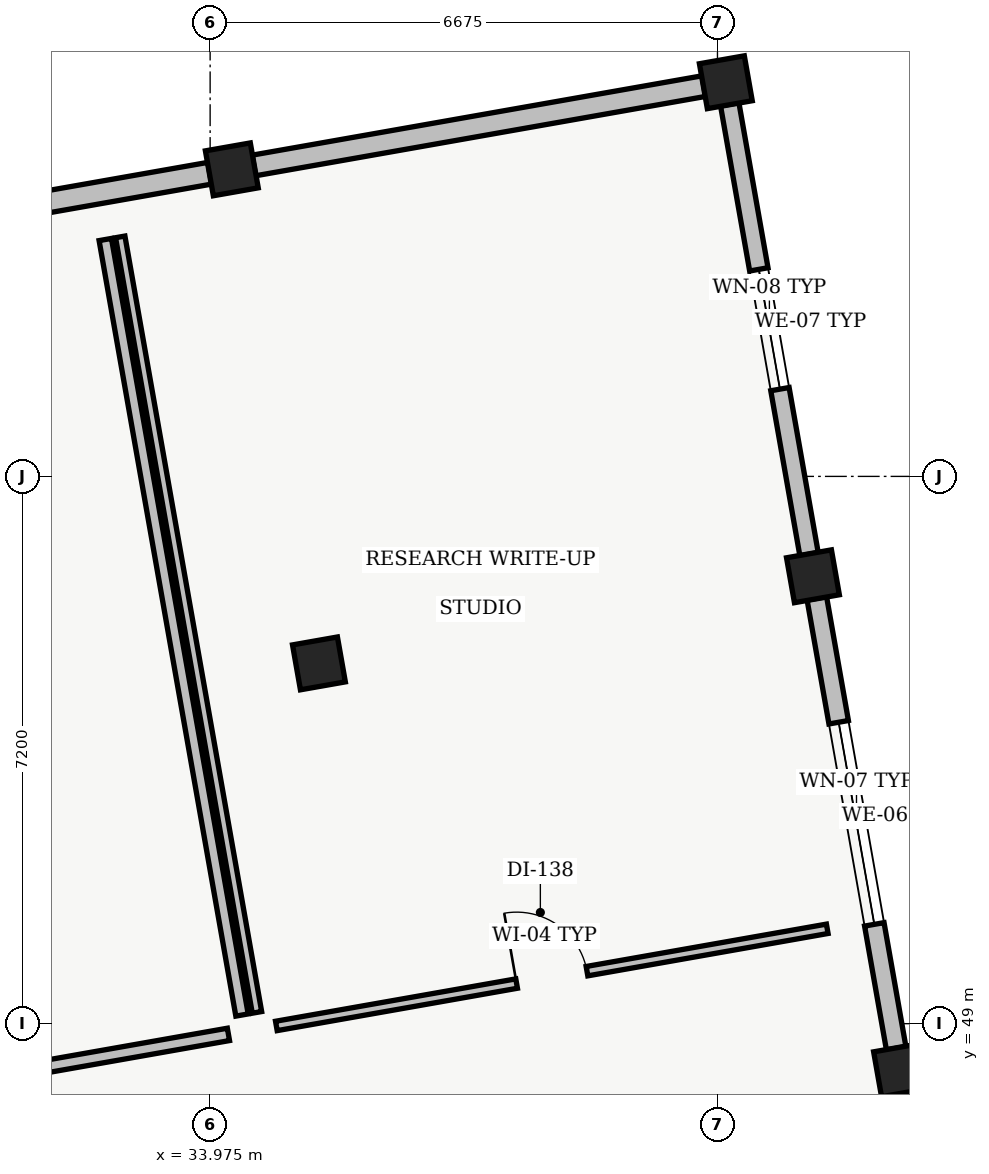
"""IFC4 building model, lengths in metres.
Left out: names, types, materials, properties, quantities, classifications, styles, units other than length and angle.
Written with IfcOpenShell. Run it as: python <this file> out.ifc"""

import sys

from ifc_helpers import new_model, si_unit, direction, frame, frame_2d, origin, origin_2d, place, context, subcontext, project, spatial, rectangle, extrude, element, fill, save


model = new_model("IFC4")
c1 = context("Model", 3, precision=1e-05, world=origin(), true_north=direction((0.0, 1.0)))
c2 = subcontext(c1, "Body", "Model", "MODEL_VIEW")
j1 = project(units=[si_unit("LENGTHUNIT", "METRE"), si_unit("PLANEANGLEUNIT", "RADIAN")], contexts=[c1])
p1 = place(None, origin())
s1 = spatial("IfcSite", under=j1, at=p1, CompositionType="ELEMENT")
p2 = place(p1, origin())
s2 = spatial("IfcBuilding", under=s1, at=p2, CompositionType="ELEMENT")
p3 = place(p2, frame((0.0, 0.0, 32.1)))
s3 = spatial("IfcBuildingStorey", under=s2, at=p3, CompositionType="ELEMENT", Elevation=32.1)
for number, where, z_axis, x_axis in (
    (1, (35.406, 53.74, 0.0), (0.0, 0.0, 1.0), (0.985, 0.174, 0.0)),
    (2, (34.26, 60.24, 0.0), (0.0, 0.0, 1.0), (0.985, 0.174, 0.0)),
    (3, (43.052, 48.386, 0.0), (0.0, 0.0, 1.0), (0.985, 0.174, 0.0)),
    (4, (41.906, 54.886, 0.0), (0.0, 0.0, 1.0), (0.985, 0.174, 0.0)),
    (5, (40.76, 61.386, 0.0), (0.0, 0.0, 1.0), (0.985, 0.174, 0.0)),
):
    element("IfcColumn", number, at=place(p3, frame(where, z_axis=z_axis, x_axis=x_axis)), inside=s3, PredefinedType="COLUMN", context=c2, shape_type="SweptSolid", body=[
        extrude(rectangle(XDim=0.6, YDim=0.6, at=origin_2d()), origin(), (0.0, 0.0, 1.0), 4.31),
    ])
p4 = place(p3, frame((28.051, 59.145, 0.0), z_axis=(0.0, 0.0, 1.0), x_axis=(0.984805634113, 0.173660194111, 0.0)))
e6 = element("IfcWall", 6, at=p4, inside=s3, PredefinedType="STANDARD", context=c2, shape_type="SweptSolid", body=[
    extrude(rectangle(XDim=6.01, YDim=0.29, at=frame_2d((3.005, 0.0))), origin(), (0.0, 0.0, 1.0), 3.795),
])
p5 = place(p4, frame((2.33, 0.0, 0.95)))
e7 = element("IfcOpeningElement", 7, at=p5, cuts=e6, PredefinedType="OPENING", context=c2, shape_type="SweptSolid", body=[
    extrude(rectangle(XDim=1.35, YDim=1.8, at=frame_2d((0.675, 0.9))), frame((0.0, 0.145, 0.0), z_axis=(0.0, -1.0, 0.0), x_axis=(1.0, 0.0, 0.0)), (0.0, 0.0, 1.0), 0.29),
])
p6 = place(p3, frame((34.551, 60.291, 0.0), z_axis=(0.0, 0.0, 1.0), x_axis=(0.984805634113, 0.173660194111, 0.0)))
e8 = element("IfcWall", 8, at=p6, inside=s3, PredefinedType="STANDARD", context=c2, shape_type="SweptSolid", body=[
    extrude(rectangle(XDim=6.01, YDim=0.275, at=frame_2d((3.005, 0.0))), origin(), (0.0, 0.0, 1.0), 3.795),
])
p7 = place(p3, frame((40.811, 61.095, 0.0), z_axis=(0.0, 0.0, 1.0), x_axis=(0.173660194111, -0.984805634113, 0.0)))
e9 = element("IfcWall", 9, at=p7, inside=s3, PredefinedType="STANDARD", context=c2, shape_type="SweptSolid", body=[
    extrude(rectangle(XDim=6.01, YDim=0.245, at=frame_2d((3.005, 0.0))), origin(), (0.0, 0.0, 1.0), 3.795),
])
p8 = place(p7, frame((2.205, 0.0, 0.95)))
e10 = element("IfcOpeningElement", 10, at=p8, cuts=e9, PredefinedType="OPENING", context=c2, shape_type="SweptSolid", body=[
    extrude(rectangle(XDim=1.6, YDim=1.4, at=frame_2d((0.8, 0.7))), frame((0.0, 0.123, 0.0), z_axis=(0.0, -1.0, 0.0), x_axis=(1.0, 0.0, 0.0)), (0.0, 0.0, 1.0), 0.245),
])
p9 = place(p3, frame((41.958, 54.595, 0.0), z_axis=(0.0, 0.0, 1.0), x_axis=(0.173620796507, -0.984812580657, 0.0)))
e11 = element("IfcWall", 11, at=p9, inside=s3, PredefinedType="STANDARD", context=c2, shape_type="SweptSolid", body=[
    extrude(rectangle(XDim=6.01, YDim=0.26, at=frame_2d((3.005, 0.0))), origin(), (0.0, 0.0, 1.0), 3.795),
])
p10 = place(p9, frame((1.655, 0.0, 0.95)))
e12 = element("IfcOpeningElement", 12, at=p10, cuts=e11, PredefinedType="OPENING", context=c2, shape_type="SweptSolid", body=[
    extrude(rectangle(XDim=2.7, YDim=1.8, at=frame_2d((1.35, 0.9))), frame((0.0, 0.13, 0.0), z_axis=(0.0, -1.0, 0.0), x_axis=(1.0, 0.0, 0.0)), (0.0, 0.0, 1.0), 0.26),
])
p11 = place(p3, frame((43.104, 48.096, 0.0), z_axis=(0.0, 0.0, 1.0), x_axis=(0.173660194111, -0.984805634113, 0.0)))
e13 = element("IfcWall", 13, at=p11, inside=s3, PredefinedType="STANDARD", context=c2, shape_type="SweptSolid", body=[
    extrude(rectangle(XDim=6.01, YDim=0.275, at=frame_2d((3.005, 0.0))), origin(), (0.0, 0.0, 1.0), 3.795),
])
p12 = place(p11, frame((1.955, 0.0, 0.95)))
e14 = element("IfcOpeningElement", 14, at=p12, cuts=e13, PredefinedType="OPENING", context=c2, shape_type="SweptSolid", body=[
    extrude(rectangle(XDim=2.1, YDim=1.8, at=frame_2d((1.05, 0.9))), frame((0.0, 0.137, 0.0), z_axis=(0.0, -1.0, 0.0), x_axis=(1.0, 0.0, 0.0)), (0.0, 0.0, 1.0), 0.275),
])
p13 = place(p3, frame((20.665, 46.469, 0.0), z_axis=(0.0, 0.0, 1.0), x_axis=(0.984807841198, 0.173647677539, 0.0)))
e15 = element("IfcWall", 15, at=p13, inside=s3, PredefinedType="PARTITIONING", context=c2, shape_type="SweptSolid", body=[
    extrude(rectangle(XDim=13.76, YDim=0.165, at=frame_2d((6.88, 0.0))), origin(), (0.0, 0.0, 1.0), 3.95),
])
p14 = place(p13, frame((6.185, 0.0, 0.0)))
e16 = element("IfcOpeningElement", 16, at=p14, cuts=e15, PredefinedType="OPENING", context=c2, shape_type="SweptSolid", body=[
    extrude(rectangle(XDim=1.39, YDim=2.16, at=frame_2d((0.695, 1.08))), frame((0.0, 0.083, 0.0), z_axis=(0.0, -1.0, 0.0), x_axis=(1.0, 0.0, 0.0)), (0.0, 0.0, 1.0), 0.165),
])
p15 = place(p3, frame((34.395, 49.114, 0.0), z_axis=(0.0, 0.0, 1.0), x_axis=(-0.173654930775, 0.984806562233, 0.0)))
e17 = element("IfcWall", 17, at=p15, inside=s3, PredefinedType="PARTITIONING", context=c2, shape_type="SweptSolid", body=[
    extrude(rectangle(XDim=10.36, YDim=0.165, at=frame_2d((5.18, 0.0))), origin(), (0.0, 0.0, 1.0), 3.95),
])
p16 = place(p3, frame((34.846, 48.97, 0.0), z_axis=(0.0, 0.0, 1.0), x_axis=(0.984813264726, 0.173616916285, 0.0)))
e18 = element("IfcWall", 18, at=p16, inside=s3, PredefinedType="PARTITIONING", context=c2, shape_type="SweptSolid", body=[
    extrude(rectangle(XDim=7.36, YDim=0.125, at=frame_2d((3.68, 0.0))), origin(), (0.0, 0.0, 1.0), 3.95),
])
p17 = place(p16, frame((3.21, 0.0, 0.0)))
e19 = element("IfcOpeningElement", 19, at=p17, cuts=e18, PredefinedType="OPENING", context=c2, shape_type="SweptSolid", body=[
    extrude(rectangle(XDim=0.94, YDim=2.12, at=frame_2d((0.47, 1.06))), frame((0.0, 0.062, 0.0), z_axis=(0.0, -1.0, 0.0), x_axis=(1.0, 0.0, 0.0)), (0.0, 0.0, 1.0), 0.125),
])
p18 = place(p3, frame((32.792, 59.351, 0.0), z_axis=(0.0, 0.0, 1.0), x_axis=(0.173632075677, -0.984810592092, 0.0)))
e20 = element("IfcWall", 20, at=p18, inside=s3, PredefinedType="PARTITIONING", context=c2, shape_type="SweptSolid", body=[
    extrude(rectangle(XDim=10.36, YDim=0.125, at=frame_2d((5.18, 0.0))), origin(), (0.0, 0.0, 1.0), 3.95),
])
p19 = place(p8, origin())
e21 = element("IfcWindow", 21, at=p19, inside=s3, PartitioningType="SINGLE_PANEL", PredefinedType="WINDOW", context=c2, shape_type="SweptSolid", body=[
    extrude(rectangle(XDim=1.6, YDim=1.4, at=frame_2d((0.8, 0.7))), frame((0.0, 0.03, 0.0), z_axis=(0.0, -1.0, 0.0), x_axis=(1.0, 0.0, 0.0)), (0.0, 0.0, 1.0), 0.06),
])
fill(e10, e21)
p20 = place(p10, origin())
e22 = element("IfcWindow", 22, at=p20, inside=s3, PartitioningType="SINGLE_PANEL", PredefinedType="WINDOW", context=c2, shape_type="SweptSolid", body=[
    extrude(rectangle(XDim=2.7, YDim=1.8, at=frame_2d((1.35, 0.9))), frame((0.0, 0.03, 0.0), z_axis=(0.0, -1.0, 0.0), x_axis=(1.0, 0.0, 0.0)), (0.0, 0.0, 1.0), 0.06),
])
fill(e12, e22)
p21 = place(p17, origin())
e23 = element("IfcDoor", 23, at=p21, inside=s3, OperationType="SINGLE_SWING_LEFT", PredefinedType="DOOR", context=c2, shape_type="SweptSolid", body=[
    extrude(rectangle(XDim=0.94, YDim=2.12, at=frame_2d((0.47, 1.06))), frame((0.0, 0.025, 0.0), z_axis=(0.0, -1.0, 0.0), x_axis=(1.0, 0.0, 0.0)), (0.0, 0.0, 1.0), 0.05),
])
fill(e19, e23)
save(model, sys.argv[1])
